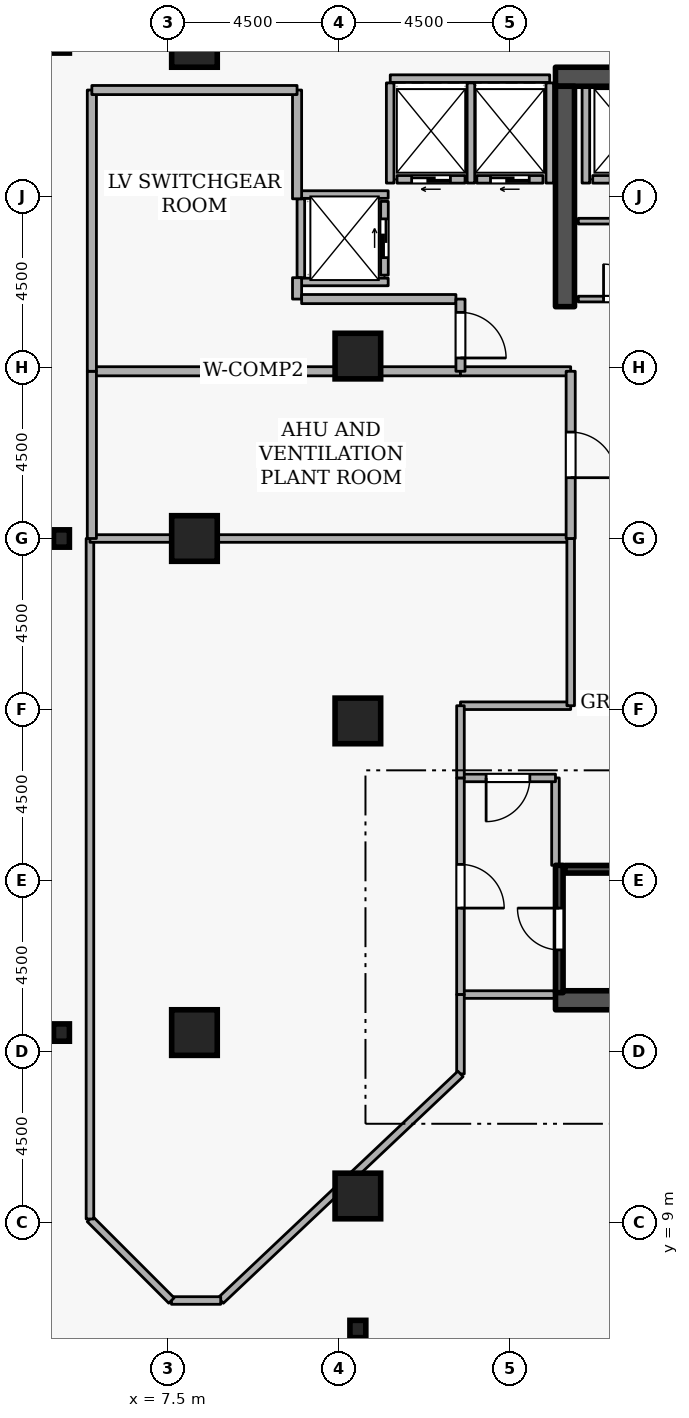
"""IFC4 building model, lengths in metres.
Left out: names, types, materials, properties, quantities, classifications, styles, units other than length and angle.
Written with IfcOpenShell. Run it as: python <this file> out.ifc"""

import sys

from ifc_helpers import new_model, si_unit, direction, frame, frame_2d, origin, origin_2d, place, context, subcontext, project, spatial, rectangle, i_section, extrude, element, fill, save


model = new_model("IFC4")
c1 = context("Model", 3, precision=1e-05, world=origin(), true_north=direction((0.0, 1.0)))
c2 = subcontext(c1, "Body", "Model", "MODEL_VIEW")
j1 = project(units=[si_unit("LENGTHUNIT", "METRE"), si_unit("PLANEANGLEUNIT", "RADIAN")], contexts=[c1])
p1 = place(None, origin())
s1 = spatial("IfcSite", under=j1, at=p1, CompositionType="ELEMENT")
p2 = place(p1, origin())
s2 = spatial("IfcBuilding", under=s1, at=p2, CompositionType="ELEMENT")
p3 = place(p2, frame((0.0, 0.0, 141.3)))
s3 = spatial("IfcBuildingStorey", under=s2, at=p3, CompositionType="ELEMENT", Elevation=141.3)
for number, where, z_axis, x_axis in (
    (1, (17.7, 14.85, 0.0), (0.0, 0.0, 1.0), (1.0, 0.0, 0.0)),
    (2, (17.7, 39.15, 0.0), (0.0, 0.0, 1.0), (1.0, 0.0, 0.0)),
):
    element("IfcWall", number, at=place(p3, frame(where, z_axis=z_axis, x_axis=x_axis)), inside=s3, PredefinedType="SHEAR", context=c2, shape_type="SweptSolid", body=[
        extrude(rectangle(XDim=15.6, YDim=0.5, at=frame_2d((7.8, 0.0))), origin(), (0.0, 0.0, 1.0), 4.2),
    ])
p4 = place(p3, frame((17.95, 33.1, 0.0), z_axis=(0.0, 0.0, 1.0), x_axis=(0.0, 1.0, 0.0)))
e3 = element("IfcWall", 3, at=p4, inside=s3, PredefinedType="SHEAR", context=c2, shape_type="SweptSolid", body=[
    extrude(rectangle(XDim=5.8, YDim=0.5, at=frame_2d((2.9, 0.0))), origin(), (0.0, 0.0, 1.0), 4.2),
])
for number, where, z_axis, x_axis in (
    (4, (12.5, 9.7, 0.0), (0.0, 0.0, 1.0), (1.0, 0.0, 0.0)),
    (5, (8.2, 14.0, 0.0), (0.0, 0.0, 1.0), (1.0, 0.0, 0.0)),
    (6, (8.2, 27.0, 0.0), (0.0, 0.0, 1.0), (1.0, 0.0, 0.0)),
    (7, (8.2, 40.0, 0.0), (0.0, 0.0, 1.0), (1.0, 0.0, 0.0)),
    (8, (12.5, 22.2, 0.0), (0.0, 0.0, 1.0), (1.0, 0.0, 0.0)),
    (9, (12.5, 31.8, 0.0), (0.0, 0.0, 1.0), (1.0, 0.0, 0.0)),
):
    element("IfcColumn", number, at=place(p3, frame(where, z_axis=z_axis, x_axis=x_axis)), inside=s3, PredefinedType="COLUMN", context=c2, shape_type="SweptSolid", body=[
        extrude(rectangle(XDim=1.2, YDim=1.2, at=origin_2d()), origin(), (0.0, 0.0, 1.0), 4.2),
    ])
for number, where, z_axis, x_axis in (
    (10, (12.5, 6.2, 0.0), (0.0, 0.0, 1.0), (1.0, 0.0, 0.0)),
    (11, (4.7, 14.0, 0.0), (0.0, 0.0, 1.0), (1.0, 0.0, 0.0)),
    (12, (4.7, 27.0, 0.0), (0.0, 0.0, 1.0), (1.0, 0.0, 0.0)),
    (13, (4.7, 40.0, 0.0), (0.0, 0.0, 1.0), (1.0, 0.0, 0.0)),
):
    element("IfcColumn", number, at=place(p3, frame(where, z_axis=z_axis, x_axis=x_axis)), inside=s3, PredefinedType="COLUMN", context=c2, shape_type="SweptSolid", body=[
        extrude(i_section(OverallWidth=0.418, OverallDepth=0.456, WebThickness=0.042, FlangeThickness=0.067, FilletRadius=0.015, at=origin_2d()), origin(), (0.0, 0.0, 1.0), 4.2),
    ])
p5 = place(p3, frame((20.62, 36.45, 0.0), z_axis=(0.0, 0.0, 1.0), x_axis=(-1.0, 0.0, 0.0)))
e14 = element("IfcWall", 14, at=p5, inside=s3, PredefinedType="STANDARD", context=c2, shape_type="SweptSolid", body=[
    extrude(rectangle(XDim=1.94, YDim=0.2, at=frame_2d((0.97, 0.0))), origin(), (0.0, 0.0, 1.0), 3.94),
])
p6 = place(p5, frame((0.46, 0.0, 0.0)))
e15 = element("IfcOpeningElement", 15, at=p6, cuts=e14, PredefinedType="OPENING", context=c2, shape_type="SweptSolid", body=[
    extrude(rectangle(XDim=1.02, YDim=2.06, at=frame_2d((0.51, 1.03))), frame((0.0, 0.11, 0.0), z_axis=(0.0, -1.0, 0.0), x_axis=(1.0, 0.0, 0.0)), (0.0, 0.0, 1.0), 0.22),
])
p7 = place(p3, frame((17.37, 36.45, 0.0), z_axis=(0.0, 0.0, 1.0), x_axis=(-1.0, 0.0, 0.0)))
e16 = element("IfcWall", 16, at=p7, inside=s3, PredefinedType="STANDARD", context=c2, shape_type="SweptSolid", body=[
    extrude(rectangle(XDim=1.74, YDim=0.2, at=frame_2d((0.87, 0.0))), origin(), (0.0, 0.0, 1.0), 3.94),
])
p8 = place(p7, frame((0.36, 0.0, 0.0)))
e17 = element("IfcOpeningElement", 17, at=p8, cuts=e16, PredefinedType="OPENING", context=c2, shape_type="SweptSolid", body=[
    extrude(rectangle(XDim=1.02, YDim=2.06, at=frame_2d((0.51, 1.03))), frame((0.0, 0.11, 0.0), z_axis=(0.0, -1.0, 0.0), x_axis=(1.0, 0.0, 0.0)), (0.0, 0.0, 1.0), 0.22),
])
p9 = place(p3, frame((15.32, 36.45, 0.0), z_axis=(0.0, 0.0, 1.0), x_axis=(-1.0, 0.0, 0.0)))
e18 = element("IfcWall", 18, at=p9, inside=s3, PredefinedType="STANDARD", context=c2, shape_type="SweptSolid", body=[
    extrude(rectangle(XDim=1.79, YDim=0.2, at=frame_2d((0.895, 0.0))), origin(), (0.0, 0.0, 1.0), 3.94),
])
p10 = place(p9, frame((0.385, 0.0, 0.0)))
e19 = element("IfcOpeningElement", 19, at=p10, cuts=e18, PredefinedType="OPENING", context=c2, shape_type="SweptSolid", body=[
    extrude(rectangle(XDim=1.02, YDim=2.06, at=frame_2d((0.51, 1.03))), frame((0.0, 0.11, 0.0), z_axis=(0.0, -1.0, 0.0), x_axis=(1.0, 0.0, 0.0)), (0.0, 0.0, 1.0), 0.22),
])
p11 = place(p3, frame((13.2, 33.93, 0.0), z_axis=(0.0, 0.0, 1.0), x_axis=(0.0, 1.0, 0.0)))
e20 = element("IfcWall", 20, at=p11, inside=s3, PredefinedType="STANDARD", context=c2, shape_type="SweptSolid", body=[
    extrude(rectangle(XDim=1.94, YDim=0.2, at=frame_2d((0.97, 0.0))), origin(), (0.0, 0.0, 1.0), 3.94),
])
p12 = place(p11, frame((0.46, 0.0, 0.0)))
e21 = element("IfcOpeningElement", 21, at=p12, cuts=e20, PredefinedType="OPENING", context=c2, shape_type="SweptSolid", body=[
    extrude(rectangle(XDim=1.02, YDim=2.06, at=frame_2d((0.51, 1.03))), frame((0.0, 0.11, 0.0), z_axis=(0.0, -1.0, 0.0), x_axis=(1.0, 0.0, 0.0)), (0.0, 0.0, 1.0), 0.22),
])
p13 = place(p3, frame((18.5, 36.352, 0.0), z_axis=(0.0, 0.0, 1.0), x_axis=(0.0, 1.0, 0.0)))
e22 = element("IfcWall", 22, at=p13, inside=s3, PredefinedType="STANDARD", context=c2, shape_type="SweptSolid", body=[
    extrude(rectangle(XDim=2.536, YDim=0.2, at=frame_2d((1.268, 0.0))), origin(), (0.0, 0.0, 1.0), 3.94),
])
p14 = place(p3, frame((13.352, 39.1, 0.0), z_axis=(0.0, 0.0, 1.0), x_axis=(1.0, 0.0, 0.0)))
e23 = element("IfcWall", 23, at=p14, inside=s3, PredefinedType="STANDARD", context=c2, shape_type="SweptSolid", body=[
    extrude(rectangle(XDim=4.196, YDim=0.2, at=frame_2d((2.098, 0.0))), origin(), (0.0, 0.0, 1.0), 3.94),
])
p15 = place(p3, frame((17.55, 36.352, 0.0), z_axis=(0.0, 0.0, 1.0), x_axis=(0.0, 1.0, 0.0)))
e24 = element("IfcWall", 24, at=p15, inside=s3, PredefinedType="STANDARD", context=c2, shape_type="SweptSolid", body=[
    extrude(rectangle(XDim=2.636, YDim=0.2, at=frame_2d((1.318, 0.0))), origin(), (0.0, 0.0, 1.0), 3.145),
])
for number, where, z_axis, x_axis in (
    (25, (15.475, 36.352, 0.0), (0.0, 0.0, 1.0), (0.0, 1.0, 0.0)),
    (26, (13.35, 36.352, 0.0), (0.0, 0.0, 1.0), (0.0, 1.0, 0.0)),
):
    element("IfcWall", number, at=place(p3, frame(where, z_axis=z_axis, x_axis=x_axis)), inside=s3, PredefinedType="STANDARD", context=c2, shape_type="SweptSolid", body=[
        extrude(rectangle(XDim=2.636, YDim=0.2, at=frame_2d((1.318, 0.0))), origin(), (0.0, 0.0, 1.0), 3.94),
    ])
for number, where, z_axis, x_axis in (
    (27, (11.002, 36.05, 0.0), (0.0, 0.0, 1.0), (1.0, 0.0, 0.0)),
    (28, (11.002, 33.75, 0.0), (0.0, 0.0, 1.0), (1.0, 0.0, 0.0)),
):
    element("IfcWall", number, at=place(p3, frame(where, z_axis=z_axis, x_axis=x_axis)), inside=s3, PredefinedType="STANDARD", context=c2, shape_type="SweptSolid", body=[
        extrude(rectangle(XDim=2.296, YDim=0.2, at=frame_2d((1.148, 0.0))), origin(), (0.0, 0.0, 1.0), 3.94),
    ])
p16 = place(p3, frame((11.0, 33.862, 0.0), z_axis=(0.0, 0.0, 1.0), x_axis=(0.0, 1.0, 0.0)))
e29 = element("IfcWall", 29, at=p16, inside=s3, PredefinedType="STANDARD", context=c2, shape_type="SweptSolid", body=[
    extrude(rectangle(XDim=2.076, YDim=0.2, at=frame_2d((1.038, 0.0))), origin(), (0.0, 0.0, 1.0), 3.94),
])
p17 = place(p3, frame((17.8, 15.05, 0.0), z_axis=(0.0, 0.0, 1.0), x_axis=(0.0, 1.0, 0.0)))
e30 = element("IfcWall", 30, at=p17, inside=s3, PredefinedType="SHEAR", context=c2, shape_type="SweptSolid", body=[
    extrude(rectangle(XDim=3.35, YDim=0.2, at=frame_2d((1.675, 0.0))), origin(), (0.0, 0.0, 1.0), 4.2),
])
p18 = place(p17, frame((1.125, 0.0, 0.0)))
e31 = element("IfcOpeningElement", 31, at=p18, cuts=e30, PredefinedType="OPENING", context=c2, shape_type="SweptSolid", body=[
    extrude(rectangle(XDim=1.1, YDim=2.1, at=frame_2d((0.55, 1.05))), frame((0.0, 0.11, 0.0), z_axis=(0.0, -1.0, 0.0), x_axis=(1.0, 0.0, 0.0)), (0.0, 0.0, 1.0), 0.22),
])
p19 = place(p3, frame((25.05, 18.297, 0.0), z_axis=(0.0, 0.0, 1.0), x_axis=(-1.0, 0.0, 0.0)))
e32 = element("IfcWall", 32, at=p19, inside=s3, PredefinedType="SHEAR", context=c2, shape_type="SweptSolid", body=[
    extrude(rectangle(XDim=7.1, YDim=0.2, at=frame_2d((3.55, 0.0))), origin(), (0.0, 0.0, 1.0), 4.2),
])
p20 = place(p3, frame((15.2, 15.0, 0.0), z_axis=(0.0, 0.0, 1.0), x_axis=(1.0, 0.0, 0.0)))
e33 = element("IfcWall", 33, at=p20, inside=s3, PredefinedType="STANDARD", context=c2, shape_type="SweptSolid", body=[
    extrude(rectangle(XDim=2.5, YDim=0.2, at=frame_2d((1.25, 0.0))), origin(), (0.0, 0.0, 1.0), 3.94),
])
p21 = place(p3, frame((17.7, 18.4, 0.0), z_axis=(0.0, 0.0, 1.0), x_axis=(0.0, 1.0, 0.0)))
e34 = element("IfcWall", 34, at=p21, inside=s3, PredefinedType="STANDARD", context=c2, shape_type="SweptSolid", body=[
    extrude(rectangle(XDim=2.3, YDim=0.2, at=frame_2d((1.15, 0.0))), origin(), (0.0, 0.0, 1.0), 3.145),
])
p22 = place(p3, frame((17.7, 20.7, 0.0), z_axis=(0.0, 0.0, 1.0), x_axis=(-1.0, 0.0, 0.0)))
e35 = element("IfcWall", 35, at=p22, inside=s3, PredefinedType="STANDARD", context=c2, shape_type="SweptSolid", body=[
    extrude(rectangle(XDim=2.5, YDim=0.2, at=frame_2d((1.25, 0.0))), origin(), (0.0, 0.0, 1.0), 3.94),
])
p23 = place(p22, frame((0.675, 0.0, 0.0)))
e36 = element("IfcOpeningElement", 36, at=p23, cuts=e35, PredefinedType="OPENING", context=c2, shape_type="SweptSolid", body=[
    extrude(rectangle(XDim=1.15, YDim=2.1, at=frame_2d((0.575, 1.05))), frame((0.0, 0.11, 0.0), z_axis=(0.0, -1.0, 0.0), x_axis=(1.0, 0.0, 0.0)), (0.0, 0.0, 1.0), 0.22),
])
p24 = place(p3, frame((15.2, 20.7, 0.0), z_axis=(0.0, 0.0, 1.0), x_axis=(0.0, -1.0, 0.0)))
e37 = element("IfcWall", 37, at=p24, inside=s3, PredefinedType="STANDARD", context=c2, shape_type="SweptSolid", body=[
    extrude(rectangle(XDim=5.7, YDim=0.2, at=frame_2d((2.85, 0.0))), origin(), (0.0, 0.0, 1.0), 3.94),
])
p25 = place(p24, frame((2.275, 0.0, 0.0)))
e38 = element("IfcOpeningElement", 38, at=p25, cuts=e37, PredefinedType="OPENING", context=c2, shape_type="SweptSolid", body=[
    extrude(rectangle(XDim=1.15, YDim=2.1, at=frame_2d((0.575, 1.05))), frame((0.0, 0.11, 0.0), z_axis=(0.0, -1.0, 0.0), x_axis=(1.0, 0.0, 0.0)), (0.0, 0.0, 1.0), 0.22),
])
p26 = place(p3, frame((18.1, 22.6, 0.0), z_axis=(0.0, 0.0, 1.0), x_axis=(-1.0, 0.0, 0.0)))
e39 = element("IfcWall", 39, at=p26, inside=s3, PredefinedType="STANDARD", context=c2, shape_type="SweptSolid", body=[
    extrude(rectangle(XDim=2.9, YDim=0.2, at=frame_2d((1.45, 0.0))), origin(), (0.0, 0.0, 1.0), 3.94),
])
p27 = place(p3, frame((15.2, 22.6, 0.0), z_axis=(0.0, 0.0, 1.0), x_axis=(0.0, -1.0, 0.0)))
e40 = element("IfcWall", 40, at=p27, inside=s3, PredefinedType="STANDARD", context=c2, shape_type="SweptSolid", body=[
    extrude(rectangle(XDim=1.9, YDim=0.2, at=frame_2d((0.95, 0.0))), origin(), (0.0, 0.0, 1.0), 3.94),
])
p28 = place(p3, frame((15.2, 15.0, 0.0), z_axis=(0.0, 0.0, 1.0), x_axis=(0.0, -1.0, 0.0)))
e41 = element("IfcWall", 41, at=p28, inside=s3, PredefinedType="STANDARD", context=c2, shape_type="SweptSolid", body=[
    extrude(rectangle(XDim=2.088, YDim=0.2, at=frame_2d((1.044, 0.0))), origin(), (0.0, 0.0, 1.0), 3.94),
])
p29 = place(p3, frame((15.2, 12.912, 0.0), z_axis=(0.0, 0.0, 1.0), x_axis=(-0.726821246223, -0.68682667103, 0.0)))
e42 = element("IfcWall", 42, at=p29, inside=s3, PredefinedType="STANDARD", context=c2, shape_type="SweptSolid", body=[
    extrude(rectangle(XDim=8.68, YDim=0.2, at=frame_2d((4.34, 0.0))), origin(), (0.0, 0.0, 1.0), 3.94),
])
p30 = place(p3, frame((8.891, 6.95, 0.0), z_axis=(0.0, 0.0, 1.0), x_axis=(-1.0, 0.0, 0.0)))
e43 = element("IfcWall", 43, at=p30, inside=s3, PredefinedType="STANDARD", context=c2, shape_type="SweptSolid", body=[
    extrude(rectangle(XDim=1.296, YDim=0.2, at=frame_2d((0.648, 0.0))), origin(), (0.0, 0.0, 1.0), 3.94),
])
p31 = place(p3, frame((7.595, 6.95, 0.0), z_axis=(0.0, 0.0, 1.0), x_axis=(-0.707106781187, 0.707106781187, 0.0)))
e44 = element("IfcWall", 44, at=p31, inside=s3, PredefinedType="STANDARD", context=c2, shape_type="SweptSolid", body=[
    extrude(rectangle(XDim=3.033, YDim=0.2, at=frame_2d((1.517, 0.0))), origin(), (0.0, 0.0, 1.0), 3.94),
])
p32 = place(p3, frame((5.45, 9.095, 0.0), z_axis=(0.0, 0.0, 1.0), x_axis=(0.0, 1.0, 0.0)))
e45 = element("IfcWall", 45, at=p32, inside=s3, PredefinedType="STANDARD", context=c2, shape_type="SweptSolid", body=[
    extrude(rectangle(XDim=17.905, YDim=0.2, at=frame_2d((8.953, 0.0))), origin(), (0.0, 0.0, 1.0), 3.94),
])
p33 = place(p3, frame((5.45, 27.0, 0.0), z_axis=(0.0, 0.0, 1.0), x_axis=(1.0, 0.0, 0.0)))
e46 = element("IfcWall", 46, at=p33, inside=s3, PredefinedType="STANDARD", context=c2, shape_type="SweptSolid", body=[
    extrude(rectangle(XDim=12.65, YDim=0.2, at=frame_2d((6.325, 0.0))), origin(), (0.0, 0.0, 1.0), 3.325),
])
p34 = place(p3, frame((18.1, 27.0, 0.0), z_axis=(0.0, 0.0, 1.0), x_axis=(0.0, -1.0, 0.0)))
e47 = element("IfcWall", 47, at=p34, inside=s3, PredefinedType="STANDARD", context=c2, shape_type="SweptSolid", body=[
    extrude(rectangle(XDim=4.4, YDim=0.2, at=frame_2d((2.2, 0.0))), origin(), (0.0, 0.0, 1.0), 3.145),
])
p35 = place(p3, frame((5.5, 31.4, 0.0), z_axis=(0.0, 0.0, 1.0), x_axis=(1.0, 0.0, 0.0)))
e48 = element("IfcWall", 48, at=p35, inside=s3, PredefinedType="STANDARD", context=c2, shape_type="SweptSolid", body=[
    extrude(rectangle(XDim=9.7, YDim=0.24, at=frame_2d((4.85, 0.0))), origin(), (0.0, 0.0, 1.0), 3.94),
])
p36 = place(p3, frame((15.2, 31.4, 0.0), z_axis=(0.0, 0.0, 1.0), x_axis=(1.0, 0.0, 0.0)))
e49 = element("IfcWall", 49, at=p36, inside=s3, PredefinedType="STANDARD", context=c2, shape_type="SweptSolid", body=[
    extrude(rectangle(XDim=2.9, YDim=0.24, at=frame_2d((1.45, 0.0))), origin(), (0.0, 0.0, 1.0), 3.94),
])
p37 = place(p3, frame((18.1, 31.4, 0.0), z_axis=(0.0, 0.0, 1.0), x_axis=(0.0, -1.0, 0.0)))
e50 = element("IfcWall", 50, at=p37, inside=s3, PredefinedType="STANDARD", context=c2, shape_type="SweptSolid", body=[
    extrude(rectangle(XDim=4.4, YDim=0.24, at=frame_2d((2.2, 0.0))), origin(), (0.0, 0.0, 1.0), 3.145),
])
p38 = place(p37, frame((1.6, 0.0, 0.0)))
e51 = element("IfcOpeningElement", 51, at=p38, cuts=e50, PredefinedType="OPENING", context=c2, shape_type="SweptSolid", body=[
    extrude(rectangle(XDim=1.2, YDim=2.1, at=frame_2d((0.6, 1.05))), frame((0.0, 0.13, 0.0), z_axis=(0.0, -1.0, 0.0), x_axis=(1.0, 0.0, 0.0)), (0.0, 0.0, 1.0), 0.26),
])
p39 = place(p3, frame((5.5, 27.0, 0.0), z_axis=(0.0, 0.0, 1.0), x_axis=(0.0, 1.0, 0.0)))
e52 = element("IfcWall", 52, at=p39, inside=s3, PredefinedType="STANDARD", context=c2, shape_type="SweptSolid", body=[
    extrude(rectangle(XDim=4.4, YDim=0.24, at=frame_2d((2.2, 0.0))), origin(), (0.0, 0.0, 1.0), 3.94),
])
p40 = place(p3, frame((10.9, 38.8, 0.0), z_axis=(0.0, 0.0, 1.0), x_axis=(0.0, -1.0, 0.0)))
e53 = element("IfcWall", 53, at=p40, inside=s3, PredefinedType="STANDARD", context=c2, shape_type="SweptSolid", body=[
    extrude(rectangle(XDim=2.862, YDim=0.24, at=frame_2d((1.431, 0.0))), origin(), (0.0, 0.0, 1.0), 3.94),
])
p41 = place(p3, frame((10.9, 33.862, 0.0), z_axis=(0.0, 0.0, 1.0), x_axis=(0.0, -1.0, 0.0)))
e54 = element("IfcWall", 54, at=p41, inside=s3, PredefinedType="STANDARD", context=c2, shape_type="SweptSolid", body=[
    extrude(rectangle(XDim=0.562, YDim=0.24, at=frame_2d((0.281, 0.0))), origin(), (0.0, 0.0, 1.0), 3.94),
])
p42 = place(p3, frame((11.02, 33.3, 0.0), z_axis=(0.0, 0.0, 1.0), x_axis=(1.0, 0.0, 0.0)))
e55 = element("IfcWall", 55, at=p42, inside=s3, PredefinedType="STANDARD", context=c2, shape_type="SweptSolid", body=[
    extrude(rectangle(XDim=4.06, YDim=0.24, at=frame_2d((2.03, 0.0))), origin(), (0.0, 0.0, 1.0), 3.94),
])
p43 = place(p3, frame((15.2, 33.3, 0.0), z_axis=(0.0, 0.0, 1.0), x_axis=(0.0, -1.0, 0.0)))
e56 = element("IfcWall", 56, at=p43, inside=s3, PredefinedType="STANDARD", context=c2, shape_type="SweptSolid", body=[
    extrude(rectangle(XDim=1.9, YDim=0.24, at=frame_2d((0.95, 0.0))), origin(), (0.0, 0.0, 1.0), 3.94),
])
p44 = place(p43, frame((0.35, 0.0, 0.0)))
e57 = element("IfcOpeningElement", 57, at=p44, cuts=e56, PredefinedType="OPENING", context=c2, shape_type="SweptSolid", body=[
    extrude(rectangle(XDim=1.2, YDim=2.1, at=frame_2d((0.6, 1.05))), frame((0.0, 0.13, 0.0), z_axis=(0.0, -1.0, 0.0), x_axis=(1.0, 0.0, 0.0)), (0.0, 0.0, 1.0), 0.26),
])
p45 = place(p3, frame((5.5, 31.4, 0.0), z_axis=(0.0, 0.0, 1.0), x_axis=(0.0, 1.0, 0.0)))
e58 = element("IfcWall", 58, at=p45, inside=s3, PredefinedType="STANDARD", context=c2, shape_type="SweptSolid", body=[
    extrude(rectangle(XDim=7.4, YDim=0.24, at=frame_2d((3.7, 0.0))), origin(), (0.0, 0.0, 1.0), 3.445),
])
p46 = place(p3, frame((5.5, 38.8, 0.0), z_axis=(0.0, 0.0, 1.0), x_axis=(1.0, 0.0, 0.0)))
e59 = element("IfcWall", 59, at=p46, inside=s3, PredefinedType="STANDARD", context=c2, shape_type="SweptSolid", body=[
    extrude(rectangle(XDim=5.4, YDim=0.24, at=frame_2d((2.7, 0.0))), origin(), (0.0, 0.0, 1.0), 3.94),
])
p47 = place(p3, frame((18.3, 33.3, 0.0), z_axis=(0.0, 0.0, 1.0), x_axis=(1.0, 0.0, 0.0)))
e60 = element("IfcWall", 60, at=p47, inside=s3, PredefinedType="PARTITIONING", context=c2, shape_type="SweptSolid", body=[
    extrude(rectangle(XDim=2.25, YDim=0.15, at=frame_2d((1.125, 0.0))), origin(), (0.0, 0.0, 1.0), 3.94),
])
p48 = place(p47, frame((0.665, 0.0, 0.0)))
e61 = element("IfcOpeningElement", 61, at=p48, cuts=e60, PredefinedType="OPENING", context=c2, shape_type="SweptSolid", body=[
    extrude(rectangle(XDim=0.92, YDim=2.08, at=frame_2d((0.46, 1.04))), frame((0.0, 0.085, 0.0), z_axis=(0.0, -1.0, 0.0), x_axis=(1.0, 0.0, 0.0)), (0.0, 0.0, 1.0), 0.17),
])
p49 = place(p3, frame((20.55, 35.35, 0.0), z_axis=(0.0, 0.0, 1.0), x_axis=(-1.0, 0.0, 0.0)))
e62 = element("IfcWall", 62, at=p49, inside=s3, PredefinedType="PARTITIONING", context=c2, shape_type="SweptSolid", body=[
    extrude(rectangle(XDim=2.25, YDim=0.15, at=frame_2d((1.125, 0.0))), origin(), (0.0, 0.0, 1.0), 3.94),
])
p50 = place(p8, origin())
e63 = element("IfcDoor", 63, at=p50, inside=s3, OperationType="SLIDING_TO_LEFT", PredefinedType="DOOR", context=c2, shape_type="SweptSolid", body=[
    extrude(rectangle(XDim=1.02, YDim=2.06, at=frame_2d((0.51, 1.03))), frame((0.0, 0.025, 0.0), z_axis=(0.0, -1.0, 0.0), x_axis=(1.0, 0.0, 0.0)), (0.0, 0.0, 1.0), 0.05),
])
fill(e17, e63)
p51 = place(p10, origin())
e64 = element("IfcDoor", 64, at=p51, inside=s3, OperationType="SLIDING_TO_LEFT", PredefinedType="DOOR", context=c2, shape_type="SweptSolid", body=[
    extrude(rectangle(XDim=1.02, YDim=2.06, at=frame_2d((0.51, 1.03))), frame((0.0, 0.025, 0.0), z_axis=(0.0, -1.0, 0.0), x_axis=(1.0, 0.0, 0.0)), (0.0, 0.0, 1.0), 0.05),
])
fill(e19, e64)
p52 = place(p12, origin())
e65 = element("IfcDoor", 65, at=p52, inside=s3, OperationType="SLIDING_TO_LEFT", PredefinedType="DOOR", context=c2, shape_type="SweptSolid", body=[
    extrude(rectangle(XDim=1.02, YDim=2.06, at=frame_2d((0.51, 1.03))), frame((0.0, 0.025, 0.0), z_axis=(0.0, -1.0, 0.0), x_axis=(1.0, 0.0, 0.0)), (0.0, 0.0, 1.0), 0.05),
])
fill(e21, e65)
p53 = place(p18, origin())
e66 = element("IfcDoor", 66, at=p53, inside=s3, OperationType="SINGLE_SWING_RIGHT", PredefinedType="DOOR", context=c2, shape_type="SweptSolid", body=[
    extrude(rectangle(XDim=1.1, YDim=2.1, at=frame_2d((0.55, 1.05))), frame((0.0, 0.025, 0.0), z_axis=(0.0, -1.0, 0.0), x_axis=(1.0, 0.0, 0.0)), (0.0, 0.0, 1.0), 0.05),
])
fill(e31, e66)
p54 = place(p23, origin())
e67 = element("IfcDoor", 67, at=p54, inside=s3, OperationType="SINGLE_SWING_RIGHT", PredefinedType="DOOR", context=c2, shape_type="SweptSolid", body=[
    extrude(rectangle(XDim=1.15, YDim=2.1, at=frame_2d((0.575, 1.05))), frame((0.0, 0.025, 0.0), z_axis=(0.0, -1.0, 0.0), x_axis=(1.0, 0.0, 0.0)), (0.0, 0.0, 1.0), 0.05),
])
fill(e36, e67)
p55 = place(p48, origin())
e68 = element("IfcDoor", 68, at=p55, inside=s3, OperationType="SINGLE_SWING_LEFT", PredefinedType="DOOR", context=c2, shape_type="SweptSolid", body=[
    extrude(rectangle(XDim=0.92, YDim=2.08, at=frame_2d((0.46, 1.04))), frame((0.0, 0.025, 0.0), z_axis=(0.0, -1.0, 0.0), x_axis=(1.0, 0.0, 0.0)), (0.0, 0.0, 1.0), 0.05),
])
fill(e61, e68)
p56 = place(p25, origin())
e69 = element("IfcDoor", 69, at=p56, inside=s3, OperationType="SINGLE_SWING_RIGHT", PredefinedType="DOOR", context=c2, shape_type="SweptSolid", body=[
    extrude(rectangle(XDim=1.15, YDim=2.1, at=frame_2d((0.575, 1.05))), frame((0.0, 0.025, 0.0), z_axis=(0.0, -1.0, 0.0), x_axis=(1.0, 0.0, 0.0)), (0.0, 0.0, 1.0), 0.05),
])
fill(e38, e69)
p57 = place(p38, origin())
e70 = element("IfcDoor", 70, at=p57, inside=s3, OperationType="SINGLE_SWING_RIGHT", PredefinedType="DOOR", context=c2, shape_type="SweptSolid", body=[
    extrude(rectangle(XDim=1.2, YDim=2.1, at=frame_2d((0.6, 1.05))), frame((0.0, 0.025, 0.0), z_axis=(0.0, -1.0, 0.0), x_axis=(1.0, 0.0, 0.0)), (0.0, 0.0, 1.0), 0.05),
])
fill(e51, e70)
p58 = place(p44, origin())
e71 = element("IfcDoor", 71, at=p58, inside=s3, OperationType="SINGLE_SWING_RIGHT", PredefinedType="DOOR", context=c2, shape_type="SweptSolid", body=[
    extrude(rectangle(XDim=1.2, YDim=2.1, at=frame_2d((0.6, 1.05))), frame((0.0, 0.025, 0.0), z_axis=(0.0, -1.0, 0.0), x_axis=(1.0, 0.0, 0.0)), (0.0, 0.0, 1.0), 0.05),
])
fill(e57, e71)
save(model, sys.argv[1])
